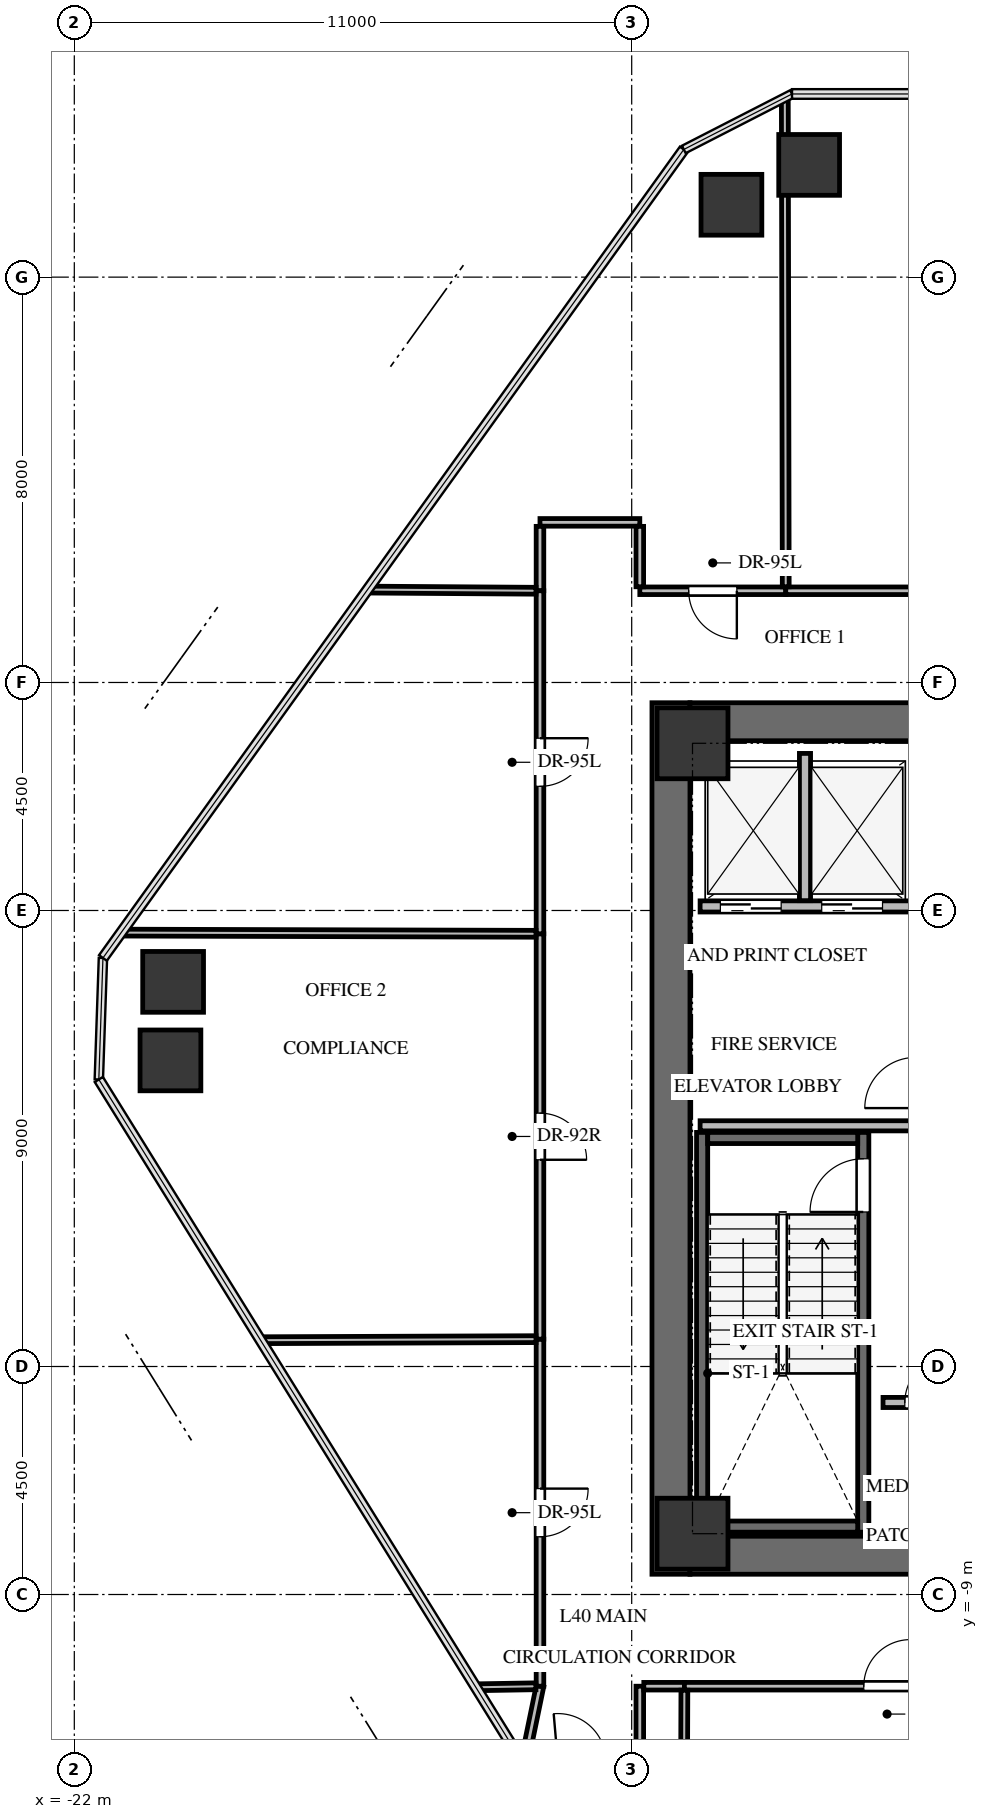
"""IFC4 building model, lengths in metres.
Left out: names, types, materials, properties, quantities, classifications, styles, units other than length and angle.
Written with IfcOpenShell. Run it as: python <this file> out.ifc"""

import sys

from ifc_helpers import new_model, si_unit, direction, frame, frame_2d, origin, origin_2d, place, context, subcontext, project, spatial, rectangle, extrude, source, transform, mapped, element, fill, save


model = new_model("IFC4")
c1 = context("Model", 3, precision=1e-05, world=origin(), true_north=direction((0.0, 1.0)))
c2 = subcontext(c1, "Body", "Model", "MODEL_VIEW")
j1 = project(units=[si_unit("LENGTHUNIT", "METRE"), si_unit("PLANEANGLEUNIT", "RADIAN")], contexts=[c1])
p1 = place(None, origin())
s1 = spatial("IfcSite", under=j1, at=p1, CompositionType="ELEMENT")
p2 = place(p1, origin())
s2 = spatial("IfcBuilding", under=s1, at=p2, CompositionType="ELEMENT")
p3 = place(p2, frame((0.0, 0.0, 146.1)))
s3 = spatial("IfcBuildingStorey", under=s2, at=p3, CompositionType="ELEMENT", Elevation=146.1)
p4 = place(p3, frame((-10.225, -8.6, 0.0), z_axis=(0.0, 0.0, 1.0), x_axis=(0.0, 1.0, 0.0)))
e1 = element("IfcWall", 1, at=p4, inside=s3, PredefinedType="SHEAR", context=c2, shape_type="SweptSolid", body=[
    extrude(rectangle(XDim=17.2, YDim=0.75, at=frame_2d((8.6, 0.0))), origin(), (0.0, 0.0, 1.0), 4.2),
])
p5 = place(p3, frame((-9.85, -8.225, 0.0), z_axis=(0.0, 0.0, 1.0), x_axis=(1.0, 0.0, 0.0)))
e2 = element("IfcWall", 2, at=p5, inside=s3, PredefinedType="SHEAR", context=c2, shape_type="SweptSolid", body=[
    extrude(rectangle(XDim=7.75, YDim=0.75, at=frame_2d((3.875, 0.0))), origin(), (0.0, 0.0, 1.0), 4.2),
])
p6 = place(p3, frame((-9.85, 8.225, 0.0), z_axis=(0.0, 0.0, 1.0), x_axis=(1.0, 0.0, 0.0)))
e3 = element("IfcWall", 3, at=p6, inside=s3, PredefinedType="SHEAR", context=c2, shape_type="SweptSolid", body=[
    extrude(rectangle(XDim=19.7, YDim=0.75, at=frame_2d((9.85, 0.0))), origin(), (0.0, 0.0, 1.0), 4.2),
])
p7 = place(p3, frame((-6.43, -7.77, -0.24), z_axis=(0.0, 0.0, 1.0), x_axis=(0.0, 1.0, 0.0)))
e4 = element("IfcWall", 4, at=p7, inside=s3, PredefinedType="SHEAR", context=c2, shape_type="SweptSolid", body=[
    extrude(rectangle(XDim=7.89, YDim=0.22, at=frame_2d((3.945, 0.0))), origin(), (0.0, 0.0, 1.0), 4.12),
])
p8 = place(p7, frame((6.32, 0.0, 0.0)))
e5 = element("IfcOpeningElement", 5, at=p8, cuts=e4, PredefinedType="OPENING", context=c2, shape_type="SweptSolid", body=[
    extrude(rectangle(XDim=1.05, YDim=2.15, at=frame_2d((0.525, 1.075))), frame((0.0, 0.12, 0.0), z_axis=(0.0, -1.0, 0.0), x_axis=(1.0, 0.0, 0.0)), (0.0, 0.0, 1.0), 0.24),
])
p9 = place(p3, frame((-9.61, 0.12, -0.24), z_axis=(0.0, 0.0, 1.0), x_axis=(0.0, -1.0, 0.0)))
e6 = element("IfcWall", 6, at=p9, inside=s3, PredefinedType="SHEAR", context=c2, shape_type="SweptSolid", body=[
    extrude(rectangle(XDim=7.89, YDim=0.22, at=frame_2d((3.945, 0.0))), origin(), (0.0, 0.0, 1.0), 4.12),
])
for number, where, z_axis, x_axis in (
    (7, (-9.5, -7.66, -0.24), (0.0, 0.0, 1.0), (1.0, 0.0, 0.0)),
    (8, (-6.54, 0.01, -0.24), (0.0, 0.0, 1.0), (-1.0, 0.0, 0.0)),
):
    element("IfcWall", number, at=place(p3, frame(where, z_axis=z_axis, x_axis=x_axis)), inside=s3, PredefinedType="SHEAR", context=c2, shape_type="SweptSolid", body=[
        extrude(rectangle(XDim=2.96, YDim=0.22, at=frame_2d((1.48, 0.0))), origin(), (0.0, 0.0, 1.0), 4.12),
    ])
m1 = source(origin(), c2, "Body", "SweptSolid", [
    extrude(rectangle(XDim=1.4, YDim=1.4, at=origin_2d()), origin(), (0.0, 0.0, 1.0), 4.12),
])
for number, where, z_axis, x_axis in (
    (9, (-9.8, -7.8, -0.24), (0.0, 0.0, 1.0), (1.0, 0.0, 0.0)),
    (10, (-9.8, 7.8, -0.24), (0.0, 0.0, 1.0), (1.0, 0.0, 0.0)),
):
    element("IfcColumn", number, at=place(p3, frame(where, z_axis=z_axis, x_axis=x_axis)), inside=s3, PredefinedType="COLUMN", context=c2, shape_type="MappedRepresentation", body=[
        mapped(m1, transform((0.0, 0.0, 0.0), x_axis=(1.0, 0.0, 0.0), y_axis=(0.0, 1.0, 0.0), z_axis=(0.0, 0.0, 1.0), scale=1.0)),
    ])
m2 = source(origin(), c2, "Body", "SweptSolid", [
    extrude(rectangle(XDim=1.2, YDim=1.2, at=origin_2d()), origin(), (0.0, 0.0, 1.0), 4.12),
])
for number, where, z_axis, x_axis in (
    (11, (-20.103, 1.542, -0.24), (0.0, 0.0, 1.0), (1.0, 0.0, 0.0)),
    (12, (-20.05, 3.091, -0.24), (0.0, 0.0, 1.0), (1.0, 0.0, 0.0)),
    (13, (-9.032, 18.428, -0.24), (0.0, 0.0, 1.0), (1.0, 0.0, 0.0)),
    (14, (-7.498, 19.215, -0.24), (0.0, 0.0, 1.0), (1.0, 0.0, 0.0)),
):
    element("IfcColumn", number, at=place(p3, frame(where, z_axis=z_axis, x_axis=x_axis)), inside=s3, PredefinedType="COLUMN", context=c2, shape_type="MappedRepresentation", body=[
        mapped(m2, transform((0.0, 0.0, 0.0), x_axis=(1.0, 0.0, 0.0), y_axis=(0.0, 1.0, 0.0), z_axis=(0.0, 0.0, 1.0), scale=1.0)),
    ])
p10 = place(p3, frame((-9.65, 4.58, 0.0), z_axis=(0.0, 0.0, 1.0), x_axis=(1.0, 0.0, 0.0)))
e15 = element("IfcWall", 15, at=p10, inside=s3, PredefinedType="SOLIDWALL", context=c2, shape_type="SweptSolid", body=[
    extrude(rectangle(XDim=4.175, YDim=0.22, at=frame_2d((2.087, 0.0))), origin(), (0.0, 0.0, 1.0), 3.865),
])
p11 = place(p10, frame((0.4, 0.0, 0.0)))
e16 = element("IfcOpeningElement", 16, at=p11, cuts=e15, PredefinedType="OPENING", context=c2, shape_type="SweptSolid", body=[
    extrude(rectangle(XDim=1.2, YDim=2.15, at=frame_2d((0.6, 1.075))), frame((0.0, 0.12, 0.0), z_axis=(0.0, -1.0, 0.0), x_axis=(1.0, 0.0, 0.0)), (0.0, 0.0, 1.0), 0.24),
])
p12 = place(p10, frame((2.4, 0.0, 0.0)))
e17 = element("IfcOpeningElement", 17, at=p12, cuts=e15, PredefinedType="OPENING", context=c2, shape_type="SweptSolid", body=[
    extrude(rectangle(XDim=1.2, YDim=2.15, at=frame_2d((0.6, 1.075))), frame((0.0, 0.12, 0.0), z_axis=(0.0, -1.0, 0.0), x_axis=(1.0, 0.0, 0.0)), (0.0, 0.0, 1.0), 0.24),
])
p13 = place(p3, frame((-7.58, 4.694, 0.0), z_axis=(0.0, 0.0, 1.0), x_axis=(0.0, 1.0, 0.0)))
e18 = element("IfcWall", 18, at=p13, inside=s3, PredefinedType="SOLIDWALL", context=c2, shape_type="SweptSolid", body=[
    extrude(rectangle(XDim=2.906, YDim=0.22, at=frame_2d((1.453, 0.0))), origin(), (0.0, 0.0, 1.0), 3.865),
])
p14 = place(p3, frame((-9.65, 0.25, 0.0), z_axis=(0.0, 0.0, 1.0), x_axis=(1.0, 0.0, 0.0)))
e19 = element("IfcWall", 19, at=p14, inside=s3, PredefinedType="SOLIDWALL", context=c2, shape_type="SweptSolid", body=[
    extrude(rectangle(XDim=4.27, YDim=0.2, at=frame_2d((2.135, 0.0))), origin(), (0.0, 0.0, 1.0), 3.865),
])
p15 = place(p3, frame((-6.04, -5.21, 0.0), z_axis=(0.0, 0.0, 1.0), x_axis=(1.0, 0.0, 0.0)))
e20 = element("IfcWall", 20, at=p15, inside=s3, PredefinedType="SOLIDWALL", context=c2, shape_type="SweptSolid", body=[
    extrude(rectangle(XDim=1.76, YDim=0.2, at=frame_2d((0.88, 0.0))), origin(), (0.0, 0.0, 1.0), 3.865),
])
p16 = place(p15, frame((0.43, 0.0, 0.0)))
e21 = element("IfcOpeningElement", 21, at=p16, cuts=e20, PredefinedType="OPENING", context=c2, shape_type="SweptSolid", body=[
    extrude(rectangle(XDim=0.9, YDim=2.05, at=frame_2d((0.45, 1.025))), frame((0.0, 0.11, 0.0), z_axis=(0.0, -1.0, 0.0), x_axis=(1.0, 0.0, 0.0)), (0.0, 0.0, 1.0), 0.22),
])
p17 = place(p3, frame((-7.96, 10.81, 0.0), z_axis=(0.0, 0.0, 1.0), x_axis=(-1.0, 0.0, 0.0)))
e22 = element("IfcWall", 22, at=p17, inside=s3, PredefinedType="PARTITIONING", context=c2, shape_type="SweptSolid", body=[
    extrude(rectangle(XDim=2.88, YDim=0.15, at=frame_2d((1.44, 0.0))), origin(), (0.0, 0.0, 1.0), 3.865),
])
p18 = place(p17, frame((0.965, 0.0, 0.0)))
e23 = element("IfcOpeningElement", 23, at=p18, cuts=e22, PredefinedType="OPENING", context=c2, shape_type="SweptSolid", body=[
    extrude(rectangle(XDim=0.95, YDim=2.1, at=frame_2d((0.475, 1.05))), frame((0.0, 0.085, 0.0), z_axis=(0.0, -1.0, 0.0), x_axis=(1.0, 0.0, 0.0)), (0.0, 0.0, 1.0), 0.17),
])
p19 = place(p3, frame((-10.84, 12.16, 0.0), z_axis=(0.0, 0.0, 1.0), x_axis=(-1.0, 0.0, 0.0)))
e24 = element("IfcWall", 24, at=p19, inside=s3, PredefinedType="PARTITIONING", context=c2, shape_type="SweptSolid", body=[
    extrude(rectangle(XDim=1.97, YDim=0.15, at=frame_2d((0.985, 0.0))), origin(), (0.0, 0.0, 1.0), 2.3),
])
p20 = place(p3, frame((-10.84, 10.889, 0.0), z_axis=(0.0, 0.0, 1.0), x_axis=(0.0, 1.0, 0.0)))
e25 = element("IfcWall", 25, at=p20, inside=s3, PredefinedType="PARTITIONING", context=c2, shape_type="SweptSolid", body=[
    extrude(rectangle(XDim=1.192, YDim=0.15, at=frame_2d((0.596, 0.0))), origin(), (0.0, 0.0, 1.0), 3.865),
])
p21 = place(p3, frame((-12.81, 12.081, 0.0), z_axis=(0.0, 0.0, 1.0), x_axis=(0.0, -1.0, 0.0)))
e26 = element("IfcWall", 26, at=p21, inside=s3, PredefinedType="PARTITIONING", context=c2, shape_type="SweptSolid", body=[
    extrude(rectangle(XDim=1.271, YDim=0.15, at=frame_2d((0.635, 0.0))), origin(), (0.0, 0.0, 1.0), 2.3),
])
p22 = place(p3, frame((0.04, 10.81, 0.0), z_axis=(0.0, 0.0, 1.0), x_axis=(-1.0, 0.0, 0.0)))
e27 = element("IfcWall", 27, at=p22, inside=s3, PredefinedType="PARTITIONING", context=c2, shape_type="SweptSolid", body=[
    extrude(rectangle(XDim=8.0, YDim=0.15, at=frame_2d((4.0, 0.0))), origin(), (0.0, 0.0, 1.0), 2.3),
])
p23 = place(p22, frame((3.54, 0.0, 0.0)))
e28 = element("IfcOpeningElement", 28, at=p23, cuts=e27, PredefinedType="OPENING", context=c2, shape_type="SweptSolid", body=[
    extrude(rectangle(XDim=0.92, YDim=2.1, at=frame_2d((0.46, 1.05))), frame((0.0, 0.085, 0.0), z_axis=(0.0, -1.0, 0.0), x_axis=(1.0, 0.0, 0.0)), (0.0, 0.0, 1.0), 0.17),
])
p24 = place(p3, frame((-12.81, -10.81, 0.0), z_axis=(0.0, 0.0, 1.0), x_axis=(-0.201786289638, -0.979429575474, 0.0)))
e29 = element("IfcWall", 29, at=p24, inside=s3, PredefinedType="PARTITIONING", context=c2, shape_type="SweptSolid", body=[
    extrude(rectangle(XDim=1.498, YDim=0.15, at=frame_2d((0.749, 0.0))), origin(), (0.0, 0.0, 1.0), 2.3),
])
p25 = place(p3, frame((-10.84, -12.16, 0.0), z_axis=(0.0, 0.0, 1.0), x_axis=(0.0, 1.0, 0.0)))
e30 = element("IfcWall", 30, at=p25, inside=s3, PredefinedType="PARTITIONING", context=c2, shape_type="SweptSolid", body=[
    extrude(rectangle(XDim=1.35, YDim=0.15, at=frame_2d((0.675, 0.0))), origin(), (0.0, 0.0, 1.0), 3.865),
])
p26 = place(p3, frame((-10.761, -10.81, 0.0), z_axis=(0.0, 0.0, 1.0), x_axis=(1.0, 0.0, 0.0)))
e31 = element("IfcWall", 31, at=p26, inside=s3, PredefinedType="PARTITIONING", context=c2, shape_type="SweptSolid", body=[
    extrude(rectangle(XDim=0.801, YDim=0.15, at=frame_2d((0.4, 0.0))), origin(), (0.0, 0.0, 1.0), 3.865),
])
p27 = place(p3, frame((-9.96, -10.81, 0.0), z_axis=(0.0, 0.0, 1.0), x_axis=(1.0, 0.0, 0.0)))
e32 = element("IfcWall", 32, at=p27, inside=s3, PredefinedType="PARTITIONING", context=c2, shape_type="SweptSolid", body=[
    extrude(rectangle(XDim=8.0, YDim=0.15, at=frame_2d((4.0, 0.0))), origin(), (0.0, 0.0, 1.0), 2.3),
])
p28 = place(p27, frame((3.54, 0.0, 0.0)))
e33 = element("IfcOpeningElement", 33, at=p28, cuts=e32, PredefinedType="OPENING", context=c2, shape_type="SweptSolid", body=[
    extrude(rectangle(XDim=0.92, YDim=2.1, at=frame_2d((0.46, 1.05))), frame((0.0, 0.085, 0.0), z_axis=(0.0, -1.0, 0.0), x_axis=(1.0, 0.0, 0.0)), (0.0, 0.0, 1.0), 0.17),
])
p29 = place(p3, frame((-12.81, -3.96, 0.0), z_axis=(0.0, 0.0, 1.0), x_axis=(0.0, -1.0, 0.0)))
e34 = element("IfcWall", 34, at=p29, inside=s3, PredefinedType="PARTITIONING", context=c2, shape_type="SweptSolid", body=[
    extrude(rectangle(XDim=6.85, YDim=0.15, at=frame_2d((3.425, 0.0))), origin(), (0.0, 0.0, 1.0), 2.3),
])
p30 = place(p29, frame((2.95, 0.0, 0.0)))
e35 = element("IfcOpeningElement", 35, at=p30, cuts=e34, PredefinedType="OPENING", context=c2, shape_type="SweptSolid", body=[
    extrude(rectangle(XDim=0.95, YDim=2.1, at=frame_2d((0.475, 1.05))), frame((0.0, 0.085, 0.0), z_axis=(0.0, -1.0, 0.0), x_axis=(1.0, 0.0, 0.0)), (0.0, 0.0, 1.0), 0.17),
])
p31 = place(p3, frame((-12.81, 4.04, 0.0), z_axis=(0.0, 0.0, 1.0), x_axis=(0.0, -1.0, 0.0)))
e36 = element("IfcWall", 36, at=p31, inside=s3, PredefinedType="PARTITIONING", context=c2, shape_type="SweptSolid", body=[
    extrude(rectangle(XDim=8.0, YDim=0.15, at=frame_2d((4.0, 0.0))), origin(), (0.0, 0.0, 1.0), 2.3),
])
p32 = place(p31, frame((3.54, 0.0, 0.0)))
e37 = element("IfcOpeningElement", 37, at=p32, cuts=e36, PredefinedType="OPENING", context=c2, shape_type="SweptSolid", body=[
    extrude(rectangle(XDim=0.92, YDim=2.1, at=frame_2d((0.46, 1.05))), frame((0.0, 0.085, 0.0), z_axis=(0.0, -1.0, 0.0), x_axis=(1.0, 0.0, 0.0)), (0.0, 0.0, 1.0), 0.17),
])
p33 = place(p3, frame((-12.81, 10.81, 0.0), z_axis=(0.0, 0.0, 1.0), x_axis=(0.0, -1.0, 0.0)))
e38 = element("IfcWall", 38, at=p33, inside=s3, PredefinedType="PARTITIONING", context=c2, shape_type="SweptSolid", body=[
    extrude(rectangle(XDim=6.77, YDim=0.15, at=frame_2d((3.385, 0.0))), origin(), (0.0, 0.0, 1.0), 3.865),
])
p34 = place(p33, frame((2.91, 0.0, 0.0)))
e39 = element("IfcOpeningElement", 39, at=p34, cuts=e38, PredefinedType="OPENING", context=c2, shape_type="SweptSolid", body=[
    extrude(rectangle(XDim=0.95, YDim=2.1, at=frame_2d((0.475, 1.05))), frame((0.0, 0.085, 0.0), z_axis=(0.0, -1.0, 0.0), x_axis=(1.0, 0.0, 0.0)), (0.0, 0.0, 1.0), 0.17),
])
p35 = place(p3, frame((-7.978, 20.542, 0.0), z_axis=(0.0, 0.0, 1.0), x_axis=(0.001871519231, -0.999998248706, 0.0)))
e40 = element("IfcWall", 40, at=p35, inside=s3, PredefinedType="PARTITIONING", context=c2, shape_type="SweptSolid", body=[
    extrude(rectangle(XDim=9.653, YDim=0.135, at=frame_2d((4.827, 0.0))), origin(), (0.0, 0.0, 1.0), 2.3),
])
p36 = place(p3, frame((-12.889, 10.811, 0.0), z_axis=(0.0, 0.0, 1.0), x_axis=(-0.999976657862, 0.006832549348, 0.0)))
e41 = element("IfcWall", 41, at=p36, inside=s3, PredefinedType="PARTITIONING", context=c2, shape_type="SweptSolid", body=[
    extrude(rectangle(XDim=3.323, YDim=0.135, at=frame_2d((1.662, 0.0))), origin(), (0.0, 0.0, 1.0), 2.3),
])
p37 = place(p3, frame((-9.96, -10.889, 0.0), z_axis=(0.0, 0.0, 1.0), x_axis=(-0.003535128042, -0.999993751415, 0.0)))
e42 = element("IfcWall", 42, at=p37, inside=s3, PredefinedType="PARTITIONING", context=c2, shape_type="SweptSolid", body=[
    extrude(rectangle(XDim=5.456, YDim=0.135, at=frame_2d((2.728, 0.0))), origin(), (0.0, 0.0, 1.0), 2.3),
])
p38 = place(p3, frame((-14.076, -10.831, 0.0), z_axis=(0.0, 0.0, 1.0), x_axis=(0.999860796611, 0.016684945308, 0.0)))
e43 = element("IfcWall", 43, at=p38, inside=s3, PredefinedType="PARTITIONING", context=c2, shape_type="SweptSolid", body=[
    extrude(rectangle(XDim=1.185, YDim=0.135, at=frame_2d((0.593, 0.0))), origin(), (0.0, 0.0, 1.0), 2.3),
])
p39 = place(p3, frame((-18.325, -3.981, 0.0), z_axis=(0.0, 0.0, 1.0), x_axis=(0.999992540381, 0.00386253575, 0.0)))
e44 = element("IfcWall", 44, at=p39, inside=s3, PredefinedType="PARTITIONING", context=c2, shape_type="SweptSolid", body=[
    extrude(rectangle(XDim=5.436, YDim=0.135, at=frame_2d((2.718, 0.0))), origin(), (0.0, 0.0, 1.0), 2.3),
])
p40 = place(p3, frame((-21.075, 4.063, 0.0), z_axis=(0.0, 0.0, 1.0), x_axis=(0.999996070799, -0.002803281363, 0.0)))
e45 = element("IfcWall", 45, at=p40, inside=s3, PredefinedType="PARTITIONING", context=c2, shape_type="SweptSolid", body=[
    extrude(rectangle(XDim=8.187, YDim=0.135, at=frame_2d((4.093, 0.0))), origin(), (0.0, 0.0, 1.0), 2.3),
])
m3 = source(origin(), c2, "Body", "SweptSolid", [
    extrude(rectangle(XDim=1.05, YDim=2.15, at=frame_2d((0.525, 1.075))), frame((0.0, 0.025, 0.0), z_axis=(0.0, -1.0, 0.0), x_axis=(1.0, 0.0, 0.0)), (0.0, 0.0, 1.0), 0.05),
])
p41 = place(p8, origin())
e46 = element("IfcDoor", 46, at=p41, inside=s3, OperationType="SINGLE_SWING_LEFT", PredefinedType="DOOR", context=c2, shape_type="MappedRepresentation", body=[
    mapped(m3, transform((0.0, 0.0, 0.0), x_axis=(1.0, 0.0, 0.0), y_axis=(0.0, 1.0, 0.0), z_axis=(0.0, 0.0, 1.0), scale=1.0)),
])
fill(e5, e46)
m4 = source(origin(), c2, "Body", "SweptSolid", [
    extrude(rectangle(XDim=1.2, YDim=2.15, at=frame_2d((0.6, 1.075))), frame((0.0, 0.025, 0.0), z_axis=(0.0, -1.0, 0.0), x_axis=(1.0, 0.0, 0.0)), (0.0, 0.0, 1.0), 0.05),
])
p42 = place(p11, origin())
e47 = element("IfcDoor", 47, at=p42, inside=s3, OperationType="DOUBLE_DOOR_SLIDING", PredefinedType="DOOR", context=c2, shape_type="MappedRepresentation", body=[
    mapped(m4, transform((0.0, 0.0, 0.0), x_axis=(1.0, 0.0, 0.0), y_axis=(0.0, 1.0, 0.0), z_axis=(0.0, 0.0, 1.0), scale=1.0)),
])
fill(e16, e47)
p43 = place(p12, origin())
e48 = element("IfcDoor", 48, at=p43, inside=s3, OperationType="DOUBLE_DOOR_SLIDING", PredefinedType="DOOR", context=c2, shape_type="MappedRepresentation", body=[
    mapped(m4, transform((0.0, 0.0, 0.0), x_axis=(1.0, 0.0, 0.0), y_axis=(0.0, 1.0, 0.0), z_axis=(0.0, 0.0, 1.0), scale=1.0)),
])
fill(e17, e48)
m5 = source(origin(), c2, "Body", "SweptSolid", [
    extrude(rectangle(XDim=0.9, YDim=2.05, at=frame_2d((0.45, 1.025))), frame((0.0, 0.025, 0.0), z_axis=(0.0, -1.0, 0.0), x_axis=(1.0, 0.0, 0.0)), (0.0, 0.0, 1.0), 0.05),
])
p44 = place(p16, origin())
e49 = element("IfcDoor", 49, at=p44, inside=s3, OperationType="SINGLE_SWING_RIGHT", PredefinedType="DOOR", context=c2, shape_type="MappedRepresentation", body=[
    mapped(m5, transform((0.0, 0.0, 0.0), x_axis=(1.0, 0.0, 0.0), y_axis=(0.0, 1.0, 0.0), z_axis=(0.0, 0.0, 1.0), scale=1.0)),
])
fill(e21, e49)
m6 = source(origin(), c2, "Body", "SweptSolid", [
    extrude(rectangle(XDim=0.95, YDim=2.1, at=frame_2d((0.475, 1.05))), frame((0.0, 0.025, 0.0), z_axis=(0.0, -1.0, 0.0), x_axis=(1.0, 0.0, 0.0)), (0.0, 0.0, 1.0), 0.05),
])
p45 = place(p18, origin())
e50 = element("IfcDoor", 50, at=p45, inside=s3, OperationType="SINGLE_SWING_LEFT", PredefinedType="DOOR", context=c2, shape_type="MappedRepresentation", body=[
    mapped(m6, transform((0.0, 0.0, 0.0), x_axis=(1.0, 0.0, 0.0), y_axis=(0.0, 1.0, 0.0), z_axis=(0.0, 0.0, 1.0), scale=1.0)),
])
fill(e23, e50)
m7 = source(origin(), c2, "Body", "SweptSolid", [
    extrude(rectangle(XDim=0.92, YDim=2.1, at=frame_2d((0.46, 1.05))), frame((0.0, 0.025, 0.0), z_axis=(0.0, -1.0, 0.0), x_axis=(1.0, 0.0, 0.0)), (0.0, 0.0, 1.0), 0.05),
])
p46 = place(p28, origin())
e51 = element("IfcDoor", 51, at=p46, inside=s3, OperationType="SINGLE_SWING_RIGHT", PredefinedType="DOOR", context=c2, shape_type="MappedRepresentation", body=[
    mapped(m7, transform((0.0, 0.0, 0.0), x_axis=(1.0, 0.0, 0.0), y_axis=(0.0, 1.0, 0.0), z_axis=(0.0, 0.0, 1.0), scale=1.0)),
])
fill(e33, e51)
p47 = place(p30, origin())
e52 = element("IfcDoor", 52, at=p47, inside=s3, OperationType="SINGLE_SWING_LEFT", PredefinedType="DOOR", context=c2, shape_type="MappedRepresentation", body=[
    mapped(m6, transform((0.0, 0.0, 0.0), x_axis=(1.0, 0.0, 0.0), y_axis=(0.0, 1.0, 0.0), z_axis=(0.0, 0.0, 1.0), scale=1.0)),
])
fill(e35, e52)
p48 = place(p32, origin())
e53 = element("IfcDoor", 53, at=p48, inside=s3, OperationType="SINGLE_SWING_RIGHT", PredefinedType="DOOR", context=c2, shape_type="MappedRepresentation", body=[
    mapped(m7, transform((0.0, 0.0, 0.0), x_axis=(1.0, 0.0, 0.0), y_axis=(0.0, 1.0, 0.0), z_axis=(0.0, 0.0, 1.0), scale=1.0)),
])
fill(e37, e53)
p49 = place(p34, origin())
e54 = element("IfcDoor", 54, at=p49, inside=s3, OperationType="SINGLE_SWING_LEFT", PredefinedType="DOOR", context=c2, shape_type="MappedRepresentation", body=[
    mapped(m6, transform((0.0, 0.0, 0.0), x_axis=(1.0, 0.0, 0.0), y_axis=(0.0, 1.0, 0.0), z_axis=(0.0, 0.0, 1.0), scale=1.0)),
])
fill(e39, e54)
save(model, sys.argv[1])
